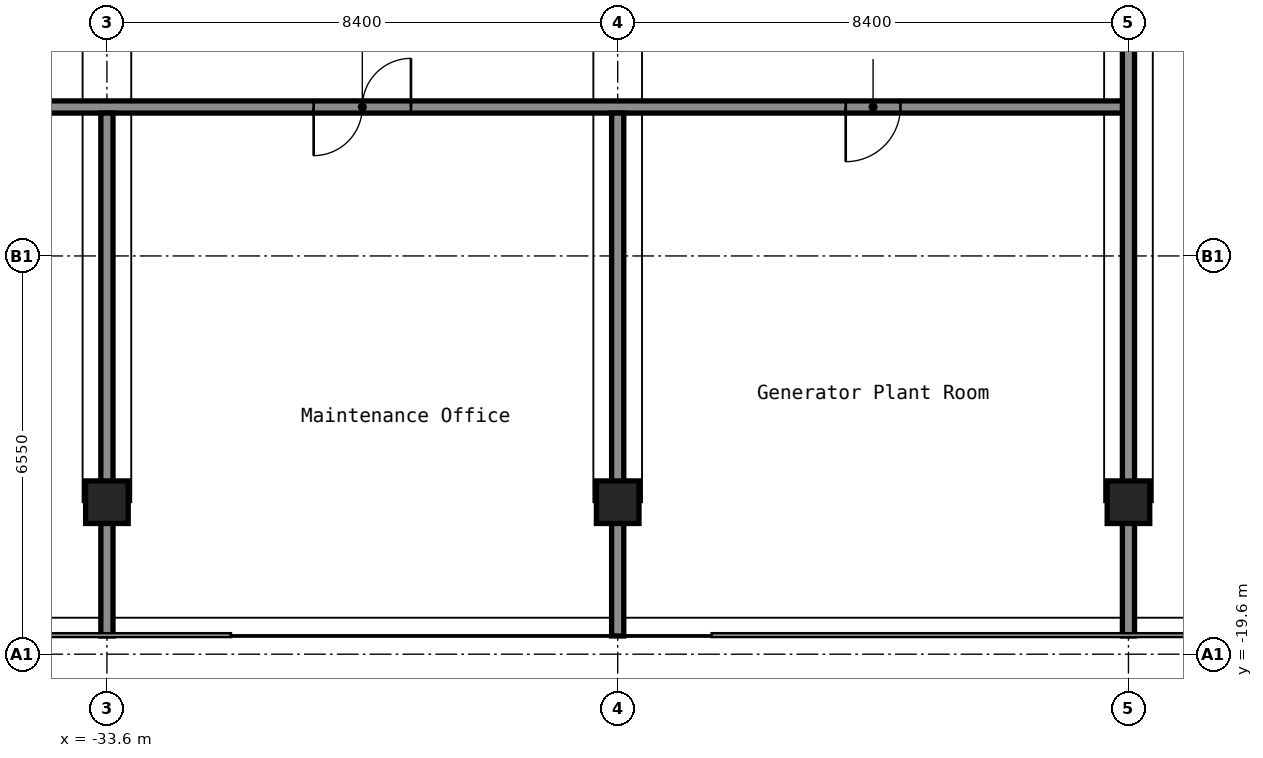
"""IFC4 building model, lengths in metres.
Left out: names, types, materials, properties, quantities, classifications, styles, units other than length and angle.
Written with IfcOpenShell. Run it as: python <this file> out.ifc"""

import sys

from ifc_helpers import new_model, si_unit, direction, frame, frame_2d, origin, origin_2d, place, context, subcontext, project, spatial, rectangle, hollow_rectangle, extrude, element, fill, save


model = new_model("IFC4")
c1 = context("Model", 3, precision=1e-05, world=origin(), true_north=direction((0.0, 1.0)))
c2 = subcontext(c1, "Body", "Model", "MODEL_VIEW")
j1 = project(units=[si_unit("LENGTHUNIT", "METRE"), si_unit("PLANEANGLEUNIT", "RADIAN")], contexts=[c1])
p1 = place(None, origin())
s1 = spatial("IfcSite", under=j1, at=p1, CompositionType="ELEMENT")
p2 = place(p1, origin())
s2 = spatial("IfcBuilding", under=s1, at=p2, CompositionType="ELEMENT")
p3 = place(p2, frame((0.0, 0.0, 175.8)))
s3 = spatial("IfcBuildingStorey", under=s2, at=p3, CompositionType="ELEMENT", Elevation=175.8)
for number, where, z_axis, x_axis in (
    (1, (-33.6, -17.1, 0.0), (0.0, 0.0, 1.0), (1.0, 0.0, 0.0)),
    (2, (-25.2, -17.1, 0.0), (0.0, 0.0, 1.0), (1.0, 0.0, 0.0)),
    (3, (-16.8, -17.1, 0.0), (0.0, 0.0, 1.0), (1.0, 0.0, 0.0)),
):
    element("IfcColumn", number, at=place(p3, frame(where, z_axis=z_axis, x_axis=x_axis)), inside=s3, PredefinedType="COLUMN", context=c2, shape_type="SweptSolid", body=[
        extrude(hollow_rectangle(XDim=0.7, YDim=0.7, WallThickness=0.028, at=origin_2d()), origin(), (0.0, 0.0, 1.0), 4.1),
    ])
p4 = place(p3, frame((-42.7, -10.6, 0.0), z_axis=(0.0, 0.0, 1.0), x_axis=(1.0, 0.0, 0.0)))
e4 = element("IfcWall", 4, at=p4, inside=s3, PredefinedType="PARTITIONING", context=c2, shape_type="SweptSolid", body=[
    extrude(rectangle(XDim=25.9, YDim=0.2, at=frame_2d((12.95, 0.0))), origin(), (0.0, 0.0, 1.0), 4.1),
])
p5 = place(p4, frame((4.25, 0.0, 0.0)))
e5 = element("IfcOpeningElement", 5, at=p5, cuts=e4, PredefinedType="OPENING", context=c2, shape_type="SweptSolid", body=[
    extrude(rectangle(XDim=0.9, YDim=2.1, at=frame_2d((0.45, 1.05))), frame((0.0, 0.11, 0.0), z_axis=(0.0, -1.0, 0.0), x_axis=(1.0, 0.0, 0.0)), (0.0, 0.0, 1.0), 0.22),
])
p6 = place(p4, frame((12.5, 0.0, 0.0)))
e6 = element("IfcOpeningElement", 6, at=p6, cuts=e4, PredefinedType="OPENING", context=c2, shape_type="SweptSolid", body=[
    extrude(rectangle(XDim=1.6, YDim=2.1, at=frame_2d((0.8, 1.05))), frame((0.0, 0.11, 0.0), z_axis=(0.0, -1.0, 0.0), x_axis=(1.0, 0.0, 0.0)), (0.0, 0.0, 1.0), 0.22),
])
p7 = place(p4, frame((21.25, 0.0, 0.0)))
e7 = element("IfcOpeningElement", 7, at=p7, cuts=e4, PredefinedType="OPENING", context=c2, shape_type="SweptSolid", body=[
    extrude(rectangle(XDim=0.9, YDim=2.1, at=frame_2d((0.45, 1.05))), frame((0.0, 0.11, 0.0), z_axis=(0.0, -1.0, 0.0), x_axis=(1.0, 0.0, 0.0)), (0.0, 0.0, 1.0), 0.22),
])
for number, where, z_axis, x_axis in (
    (8, (-33.6, -19.3, 0.0), (0.0, 0.0, 1.0), (0.0, 1.0, 0.0)),
    (9, (-25.2, -19.3, 0.0), (0.0, 0.0, 1.0), (0.0, 1.0, 0.0)),
):
    element("IfcWall", number, at=place(p3, frame(where, z_axis=z_axis, x_axis=x_axis)), inside=s3, PredefinedType="PARTITIONING", context=c2, shape_type="SweptSolid", body=[
        extrude(rectangle(XDim=8.6, YDim=0.2, at=frame_2d((4.3, 0.0))), origin(), (0.0, 0.0, 1.0), 4.1),
    ])
p8 = place(p3, frame((-16.8, -19.3, 0.0), z_axis=(0.0, 0.0, 1.0), x_axis=(0.0, 1.0, 0.0)))
e10 = element("IfcWall", 10, at=p8, inside=s3, PredefinedType="PARTITIONING", context=c2, shape_type="SweptSolid", body=[
    extrude(rectangle(XDim=10.91, YDim=0.2, at=frame_2d((5.455, 0.0))), origin(), (0.0, 0.0, 1.0), 4.1),
])
p9 = place(p6, origin())
e11 = element("IfcDoor", 11, at=p9, inside=s3, OperationType="DOUBLE_DOOR_SINGLE_SWING", PredefinedType="DOOR", context=c2, shape_type="SweptSolid", body=[
    extrude(rectangle(XDim=1.6, YDim=2.1, at=frame_2d((0.8, 1.05))), frame((0.0, 0.025, 0.0), z_axis=(0.0, -1.0, 0.0), x_axis=(1.0, 0.0, 0.0)), (0.0, 0.0, 1.0), 0.05),
])
fill(e6, e11)
p10 = place(p7, origin())
e12 = element("IfcDoor", 12, at=p10, inside=s3, OperationType="SINGLE_SWING_LEFT", PredefinedType="DOOR", context=c2, shape_type="SweptSolid", body=[
    extrude(rectangle(XDim=0.9, YDim=2.1, at=frame_2d((0.45, 1.05))), frame((0.0, 0.025, 0.0), z_axis=(0.0, -1.0, 0.0), x_axis=(1.0, 0.0, 0.0)), (0.0, 0.0, 1.0), 0.05),
])
fill(e7, e12)
save(model, sys.argv[1])
